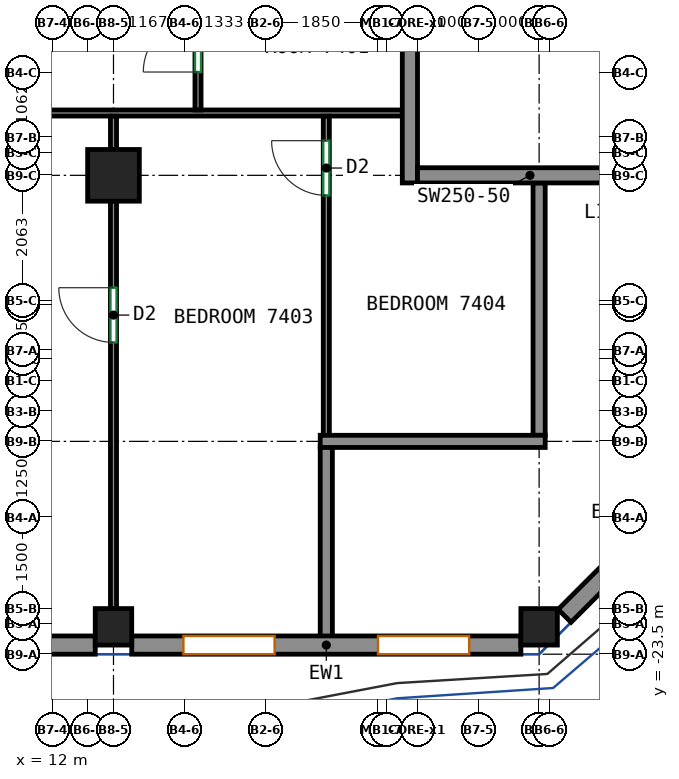
"""IFC4 building model, lengths in metres.
Left out: names, types, materials, properties, quantities, classifications, styles, units other than length and angle.
Written with IfcOpenShell. Run it as: python <this file> out.ifc"""

import sys

from ifc_helpers import new_model, si_unit, direction, frame, frame_2d, origin, origin_2d, place, context, subcontext, project, spatial, rectangle, extrude, source, transform, mapped, element, fill, save


model = new_model("IFC4")
c1 = context("Model", 3, precision=1e-05, world=origin(), true_north=direction((0.0, 1.0)))
c2 = subcontext(c1, "Body", "Model", "MODEL_VIEW")
j1 = project(units=[si_unit("LENGTHUNIT", "METRE"), si_unit("PLANEANGLEUNIT", "RADIAN")], contexts=[c1])
p1 = place(None, origin())
s1 = spatial("IfcSite", under=j1, at=p1, CompositionType="ELEMENT")
p2 = place(p1, origin())
s2 = spatial("IfcBuilding", under=s1, at=p2, CompositionType="ELEMENT")
p3 = place(p2, frame((0.0, 0.0, 298.4)))
s3 = spatial("IfcBuildingStorey", under=s2, at=p3, CompositionType="ELEMENT", Elevation=298.4)
m1 = source(origin(), c2, "Body", "SweptSolid", [
    extrude(rectangle(XDim=0.6, YDim=0.6, at=origin_2d()), origin(), (0.0, 0.0, 1.0), 3.12),
])
p4 = place(p3, frame((13.0, -23.05, 0.0), z_axis=(0.0, 0.0, 1.0), x_axis=(1.0, 0.0, 0.0)))
e1 = element("IfcColumn", 1, at=p4, inside=s3, PredefinedType="COLUMN", context=c2, shape_type="MappedRepresentation", body=[
    mapped(m1, transform((0.0, 0.0, 0.0))),
])
m2 = source(origin(), c2, "Body", "SweptSolid", [
    extrude(rectangle(XDim=0.85, YDim=0.85, at=origin_2d()), origin(), (0.0, 0.0, 1.0), 3.12),
])
p5 = place(p3, frame((13.0, -15.625, 0.0), z_axis=(0.0, 0.0, 1.0), x_axis=(1.0, 0.0, 0.0)))
e2 = element("IfcColumn", 2, at=p5, inside=s3, PredefinedType="COLUMN", context=c2, shape_type="MappedRepresentation", body=[
    mapped(m2, transform((0.0, 0.0, 0.0))),
])
p6 = place(p3, frame((20.0, -23.05, 0.0), z_axis=(0.0, 0.0, 1.0), x_axis=(1.0, 0.0, 0.0)))
e3 = element("IfcColumn", 3, at=p6, inside=s3, PredefinedType="COLUMN", context=c2, shape_type="MappedRepresentation", body=[
    mapped(m1, transform((0.0, 0.0, 0.0))),
])
m3 = source(origin(), c2, "Body", "SweptSolid", [
    extrude(rectangle(XDim=8.0, YDim=0.25, at=frame_2d((4.0, 0.0))), origin(), (0.0, 0.0, 1.0), 3.12),
])
p7 = place(p3, frame((17.875, -15.75, 0.0), z_axis=(0.0, 0.0, 1.0), x_axis=(0.0, 1.0, 0.0)))
e4 = element("IfcWall", 4, at=p7, inside=s3, PredefinedType="SHEAR", context=c2, shape_type="MappedRepresentation", body=[
    mapped(m3, transform((0.0, 0.0, 0.0))),
])
m4 = source(origin(), c2, "Body", "SweptSolid", [
    extrude(rectangle(XDim=3.7, YDim=0.25, at=frame_2d((1.85, 0.0))), origin(), (0.0, 0.0, 1.0), 3.12),
])
p8 = place(p3, frame((18.0, -15.625, 0.0), z_axis=(0.0, 0.0, 1.0), x_axis=(1.0, 0.0, 0.0)))
e5 = element("IfcWall", 5, at=p8, inside=s3, PredefinedType="SHEAR", context=c2, shape_type="MappedRepresentation", body=[
    mapped(m4, transform((0.0, 0.0, 0.0))),
])
m5 = source(origin(), c2, "Body", "SweptSolid", [
    extrude(rectangle(XDim=6.4, YDim=0.3, at=frame_2d((3.2, 0.0))), origin(), (0.0, 0.0, 1.0), 3.12),
])
p9 = place(p3, frame((6.3, -23.35, 0.0), z_axis=(0.0, 0.0, 1.0), x_axis=(1.0, 0.0, 0.0)))
e6 = element("IfcWall", 6, at=p9, inside=s3, PredefinedType="SOLIDWALL", context=c2, shape_type="MappedRepresentation", body=[
    mapped(m5, transform((0.0, 0.0, 0.0))),
])
p10 = place(p9, frame((0.85, 0.0, 0.8)))
e7 = element("IfcOpeningElement", 7, at=p10, cuts=e6, PredefinedType="OPENING", context=c2, shape_type="SweptSolid", body=[
    extrude(rectangle(XDim=1.5, YDim=2.05, at=frame_2d((0.75, 1.025))), frame((0.0, 0.16, 0.0), z_axis=(0.0, -1.0, 0.0), x_axis=(1.0, 0.0, 0.0)), (0.0, 0.0, 1.0), 0.32),
])
p11 = place(p9, frame((4.05, 0.0, 0.8)))
e8 = element("IfcOpeningElement", 8, at=p11, cuts=e6, PredefinedType="OPENING", context=c2, shape_type="SweptSolid", body=[
    extrude(rectangle(XDim=1.5, YDim=2.05, at=frame_2d((0.75, 1.025))), frame((0.0, 0.16, 0.0), z_axis=(0.0, -1.0, 0.0), x_axis=(1.0, 0.0, 0.0)), (0.0, 0.0, 1.0), 0.32),
])
p12 = place(p3, frame((13.3, -23.35, 0.0), z_axis=(0.0, 0.0, 1.0), x_axis=(1.0, 0.0, 0.0)))
e9 = element("IfcWall", 9, at=p12, inside=s3, PredefinedType="SOLIDWALL", context=c2, shape_type="MappedRepresentation", body=[
    mapped(m5, transform((0.0, 0.0, 0.0))),
])
p13 = place(p12, frame((0.85, 0.0, 0.8)))
e10 = element("IfcOpeningElement", 10, at=p13, cuts=e9, PredefinedType="OPENING", context=c2, shape_type="SweptSolid", body=[
    extrude(rectangle(XDim=1.5, YDim=2.05, at=frame_2d((0.75, 1.025))), frame((0.0, 0.16, 0.0), z_axis=(0.0, -1.0, 0.0), x_axis=(1.0, 0.0, 0.0)), (0.0, 0.0, 1.0), 0.32),
])
p14 = place(p12, frame((4.05, 0.0, 0.8)))
e11 = element("IfcOpeningElement", 11, at=p14, cuts=e9, PredefinedType="OPENING", context=c2, shape_type="SweptSolid", body=[
    extrude(rectangle(XDim=1.5, YDim=2.05, at=frame_2d((0.75, 1.025))), frame((0.0, 0.16, 0.0), z_axis=(0.0, -1.0, 0.0), x_axis=(1.0, 0.0, 0.0)), (0.0, 0.0, 1.0), 0.32),
])
m6 = source(origin(), c2, "Body", "SweptSolid", [
    extrude(rectangle(XDim=3.783, YDim=0.3, at=frame_2d((1.892, 0.0))), origin(), (0.0, 0.0, 1.0), 3.12),
])
p15 = place(p3, frame((20.419, -22.869, 0.0), z_axis=(0.0, 0.0, 1.0), x_axis=(0.707106781187, 0.707106781187, 0.0)))
e12 = element("IfcWall", 12, at=p15, inside=s3, PredefinedType="SOLIDWALL", context=c2, shape_type="MappedRepresentation", body=[
    mapped(m6, transform((0.0, 0.0, 0.0))),
])
p16 = place(p15, frame((1.75, 0.0, 0.8)))
e13 = element("IfcOpeningElement", 13, at=p16, cuts=e12, PredefinedType="OPENING", context=c2, shape_type="SweptSolid", body=[
    extrude(rectangle(XDim=1.5, YDim=2.05, at=frame_2d((0.75, 1.025))), frame((0.0, 0.16, 0.0), z_axis=(0.0, -1.0, 0.0), x_axis=(1.0, 0.0, 0.0)), (0.0, 0.0, 1.0), 0.32),
])
p17 = place(p3, frame((-13.55, -14.6, 0.0), z_axis=(0.0, 0.0, 1.0), x_axis=(1.0, 0.0, 0.0)))
e14 = element("IfcWall", 14, at=p17, inside=s3, PredefinedType="PARTITIONING", context=c2, shape_type="SweptSolid", body=[
    extrude(rectangle(XDim=31.3, YDim=0.1, at=frame_2d((15.65, 0.0))), origin(), (0.0, 0.0, 1.0), 3.12),
])
p18 = place(p17, frame((0.309, 0.0, 0.0)))
e15 = element("IfcOpeningElement", 15, at=p18, cuts=e14, PredefinedType="OPENING", context=c2, shape_type="SweptSolid", body=[
    extrude(rectangle(XDim=0.9, YDim=2.1, at=frame_2d((0.45, 1.05))), frame((0.0, 0.06, 0.0), z_axis=(0.0, -1.0, 0.0), x_axis=(1.0, 0.0, 0.0)), (0.0, 0.0, 1.0), 0.12),
])
p19 = place(p17, frame((4.103, 0.0, 0.0)))
e16 = element("IfcOpeningElement", 16, at=p19, cuts=e14, PredefinedType="OPENING", context=c2, shape_type="SweptSolid", body=[
    extrude(rectangle(XDim=1.0, YDim=2.1, at=frame_2d((0.5, 1.05))), frame((0.0, 0.06, 0.0), z_axis=(0.0, -1.0, 0.0), x_axis=(1.0, 0.0, 0.0)), (0.0, 0.0, 1.0), 0.12),
])
p20 = place(p17, frame((13.955, 0.0, 0.0)))
e17 = element("IfcOpeningElement", 17, at=p20, cuts=e14, PredefinedType="OPENING", context=c2, shape_type="SweptSolid", body=[
    extrude(rectangle(XDim=0.9, YDim=2.1, at=frame_2d((0.45, 1.05))), frame((0.0, 0.06, 0.0), z_axis=(0.0, -1.0, 0.0), x_axis=(1.0, 0.0, 0.0)), (0.0, 0.0, 1.0), 0.12),
])
p21 = place(p17, frame((17.453, 0.0, 0.0)))
e18 = element("IfcOpeningElement", 18, at=p21, cuts=e14, PredefinedType="OPENING", context=c2, shape_type="SweptSolid", body=[
    extrude(rectangle(XDim=1.0, YDim=2.1, at=frame_2d((0.5, 1.05))), frame((0.0, 0.06, 0.0), z_axis=(0.0, -1.0, 0.0), x_axis=(1.0, 0.0, 0.0)), (0.0, 0.0, 1.0), 0.12),
])
p22 = place(p17, frame((23.13, 0.0, 0.0)))
e19 = element("IfcOpeningElement", 19, at=p22, cuts=e14, PredefinedType="OPENING", context=c2, shape_type="SweptSolid", body=[
    extrude(rectangle(XDim=1.0, YDim=2.1, at=frame_2d((0.5, 1.05))), frame((0.0, 0.06, 0.0), z_axis=(0.0, -1.0, 0.0), x_axis=(1.0, 0.0, 0.0)), (0.0, 0.0, 1.0), 0.12),
])
p23 = place(p3, frame((14.39, -14.55, 0.0), z_axis=(0.0, 0.0, 1.0), x_axis=(0.0, 1.0, 0.0)))
e20 = element("IfcWall", 20, at=p23, inside=s3, PredefinedType="PARTITIONING", context=c2, shape_type="SweptSolid", body=[
    extrude(rectangle(XDim=2.573, YDim=0.1, at=frame_2d((1.287, 0.0))), origin(), (0.0, 0.0, 1.0), 3.12),
])
p24 = place(p23, frame((0.624, 0.0, 0.0)))
e21 = element("IfcOpeningElement", 21, at=p24, cuts=e20, PredefinedType="OPENING", context=c2, shape_type="SweptSolid", body=[
    extrude(rectangle(XDim=0.9, YDim=2.1, at=frame_2d((0.45, 1.05))), frame((0.0, 0.06, 0.0), z_axis=(0.0, -1.0, 0.0), x_axis=(1.0, 0.0, 0.0)), (0.0, 0.0, 1.0), 0.12),
])
p25 = place(p3, frame((13.0, -15.2, 0.0), z_axis=(0.0, 0.0, 1.0), x_axis=(0.0, 1.0, 0.0)))
e22 = element("IfcWall", 22, at=p25, inside=s3, PredefinedType="PARTITIONING", context=c2, shape_type="SweptSolid", body=[
    extrude(rectangle(XDim=0.548, YDim=0.1, at=frame_2d((0.274, 0.0))), origin(), (0.0, 0.0, 1.0), 3.12),
])
p26 = place(p3, frame((13.0, -22.75, 0.0), z_axis=(0.0, 0.0, 1.0), x_axis=(0.0, 1.0, 0.0)))
e23 = element("IfcWall", 23, at=p26, inside=s3, PredefinedType="PARTITIONING", context=c2, shape_type="SweptSolid", body=[
    extrude(rectangle(XDim=6.7, YDim=0.1, at=frame_2d((3.35, 0.0))), origin(), (0.0, 0.0, 1.0), 3.12),
])
p27 = place(p26, frame((4.377, 0.0, 0.0)))
e24 = element("IfcOpeningElement", 24, at=p27, cuts=e23, PredefinedType="OPENING", context=c2, shape_type="SweptSolid", body=[
    extrude(rectangle(XDim=0.9, YDim=2.1, at=frame_2d((0.45, 1.05))), frame((0.0, 0.06, 0.0), z_axis=(0.0, -1.0, 0.0), x_axis=(1.0, 0.0, 0.0)), (0.0, 0.0, 1.0), 0.12),
])
p28 = place(p3, frame((16.5, -19.91, 0.0), z_axis=(0.0, 0.0, 1.0), x_axis=(0.0, 1.0, 0.0)))
e25 = element("IfcWall", 25, at=p28, inside=s3, PredefinedType="PARTITIONING", context=c2, shape_type="SweptSolid", body=[
    extrude(rectangle(XDim=5.258, YDim=0.1, at=frame_2d((2.629, 0.0))), origin(), (0.0, 0.0, 1.0), 3.12),
])
p29 = place(p28, frame((3.955, 0.0, 0.0)))
e26 = element("IfcOpeningElement", 26, at=p29, cuts=e25, PredefinedType="OPENING", context=c2, shape_type="SweptSolid", body=[
    extrude(rectangle(XDim=0.9, YDim=2.1, at=frame_2d((0.45, 1.05))), frame((0.0, 0.06, 0.0), z_axis=(0.0, -1.0, 0.0), x_axis=(1.0, 0.0, 0.0)), (0.0, 0.0, 1.0), 0.12),
])
p30 = place(p3, frame((16.5, -23.25, 0.0), z_axis=(0.0, 0.0, 1.0), x_axis=(0.0, 1.0, 0.0)))
e27 = element("IfcWall", 27, at=p30, inside=s3, PredefinedType="PARTITIONING", context=c2, shape_type="SweptSolid", body=[
    extrude(rectangle(XDim=3.16, YDim=0.2, at=frame_2d((1.58, 0.0))), origin(), (0.0, 0.0, 1.0), 3.12),
])
p31 = place(p3, frame((20.0, -19.9, 0.0), z_axis=(0.0, 0.0, 1.0), x_axis=(0.0, 1.0, 0.0)))
e28 = element("IfcWall", 28, at=p31, inside=s3, PredefinedType="PARTITIONING", context=c2, shape_type="SweptSolid", body=[
    extrude(rectangle(XDim=4.15, YDim=0.2, at=frame_2d((2.075, 0.0))), origin(), (0.0, 0.0, 1.0), 3.12),
])
p32 = place(p3, frame((16.4, -20.0, 0.0), z_axis=(0.0, 0.0, 1.0), x_axis=(1.0, 0.0, 0.0)))
e29 = element("IfcWall", 29, at=p32, inside=s3, PredefinedType="PARTITIONING", context=c2, shape_type="SweptSolid", body=[
    extrude(rectangle(XDim=3.7, YDim=0.2, at=frame_2d((1.85, 0.0))), origin(), (0.0, 0.0, 1.0), 3.12),
])
p33 = place(p13, origin())
e30 = element("IfcWindow", 30, at=p33, inside=s3, PartitioningType="SINGLE_PANEL", PredefinedType="WINDOW", context=c2, shape_type="SweptSolid", body=[
    extrude(rectangle(XDim=1.5, YDim=2.05, at=frame_2d((0.75, 1.025))), frame((0.0, 0.03, 0.0), z_axis=(0.0, -1.0, 0.0), x_axis=(1.0, 0.0, 0.0)), (0.0, 0.0, 1.0), 0.06),
])
fill(e10, e30)
p34 = place(p14, origin())
e31 = element("IfcWindow", 31, at=p34, inside=s3, PartitioningType="SINGLE_PANEL", PredefinedType="WINDOW", context=c2, shape_type="SweptSolid", body=[
    extrude(rectangle(XDim=1.5, YDim=2.05, at=frame_2d((0.75, 1.025))), frame((0.0, 0.03, 0.0), z_axis=(0.0, -1.0, 0.0), x_axis=(1.0, 0.0, 0.0)), (0.0, 0.0, 1.0), 0.06),
])
fill(e11, e31)
p35 = place(p27, origin())
e32 = element("IfcDoor", 32, at=p35, inside=s3, OperationType="SINGLE_SWING_RIGHT", PredefinedType="DOOR", context=c2, shape_type="SweptSolid", body=[
    extrude(rectangle(XDim=0.9, YDim=2.1, at=frame_2d((0.45, 1.05))), frame((0.0, 0.025, 0.0), z_axis=(0.0, -1.0, 0.0), x_axis=(1.0, 0.0, 0.0)), (0.0, 0.0, 1.0), 0.05),
])
fill(e24, e32)
p36 = place(p29, origin())
e33 = element("IfcDoor", 33, at=p36, inside=s3, OperationType="SINGLE_SWING_RIGHT", PredefinedType="DOOR", context=c2, shape_type="SweptSolid", body=[
    extrude(rectangle(XDim=0.9, YDim=2.1, at=frame_2d((0.45, 1.05))), frame((0.0, 0.025, 0.0), z_axis=(0.0, -1.0, 0.0), x_axis=(1.0, 0.0, 0.0)), (0.0, 0.0, 1.0), 0.05),
])
fill(e26, e33)
p37 = place(p24, origin())
e34 = element("IfcDoor", 34, at=p37, inside=s3, OperationType="SINGLE_SWING_LEFT", PredefinedType="DOOR", context=c2, shape_type="SweptSolid", body=[
    extrude(rectangle(XDim=0.9, YDim=2.1, at=frame_2d((0.45, 1.05))), frame((0.0, 0.025, 0.0), z_axis=(0.0, -1.0, 0.0), x_axis=(1.0, 0.0, 0.0)), (0.0, 0.0, 1.0), 0.05),
])
fill(e21, e34)
save(model, sys.argv[1])
